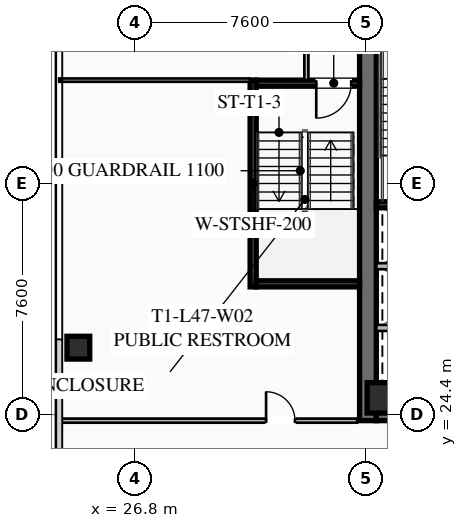
"""IFC4 building model, lengths in metres.
Left out: names, types, materials, properties, quantities, classifications, styles, units other than length and angle.
Written with IfcOpenShell. Run it as: python <this file> out.ifc"""

import sys

from ifc_helpers import new_model, si_unit, direction, frame, frame_2d, origin, origin_2d, place, context, subcontext, project, spatial, rectangle, hollow_rectangle, extrude, element, fill, save


model = new_model("IFC4")
c1 = context("Model", 3, precision=1e-05, world=origin(), true_north=direction((0.0, 1.0)))
c2 = subcontext(c1, "Body", "Model", "MODEL_VIEW")
j1 = project(units=[si_unit("LENGTHUNIT", "METRE"), si_unit("PLANEANGLEUNIT", "RADIAN")], contexts=[c1])
p1 = place(None, origin())
s1 = spatial("IfcSite", under=j1, at=p1, CompositionType="ELEMENT")
p2 = place(p1, origin())
s2 = spatial("IfcBuilding", under=s1, at=p2, CompositionType="ELEMENT")
p3 = place(p2, frame((0.0, 0.0, 174.75)))
s3 = spatial("IfcBuildingStorey", under=s2, at=p3, CompositionType="ELEMENT", Elevation=174.75)
p4 = place(p3, frame((34.475, 24.2, 0.0), z_axis=(0.0, 0.0, 1.0), x_axis=(0.0, 1.0, 0.0)))
e1 = element("IfcWall", 1, at=p4, inside=s3, PredefinedType="SHEAR", context=c2, shape_type="SweptSolid", body=[
    extrude(rectangle(XDim=15.6, YDim=0.55, at=frame_2d((7.8, 0.0))), origin(), (0.0, 0.0, 1.0), 3.55),
])
p5 = place(p3, frame((49.25, 24.475, 0.0), z_axis=(0.0, 0.0, 1.0), x_axis=(-1.0, 0.0, 0.0)))
e2 = element("IfcWall", 2, at=p5, inside=s3, PredefinedType="SHEAR", context=c2, shape_type="SweptSolid", body=[
    extrude(rectangle(XDim=14.5, YDim=0.55, at=frame_2d((7.25, 0.0))), origin(), (0.0, 0.0, 1.0), 3.55),
])
p6 = place(p5, frame((8.95, 0.0, 0.0)))
e3 = element("IfcOpeningElement", 3, at=p6, cuts=e2, PredefinedType="OPENING", context=c2, shape_type="SweptSolid", body=[
    extrude(rectangle(XDim=1.25, YDim=2.25, at=frame_2d((0.625, 1.125))), frame((0.0, 0.285, 0.0), z_axis=(0.0, -1.0, 0.0), x_axis=(1.0, 0.0, 0.0)), (0.0, 0.0, 1.0), 0.57),
])
p7 = place(p5, frame((3.9, 0.0, 0.0)))
e4 = element("IfcOpeningElement", 4, at=p7, cuts=e2, PredefinedType="OPENING", context=c2, shape_type="SweptSolid", body=[
    extrude(rectangle(XDim=1.25, YDim=2.25, at=frame_2d((0.625, 1.125))), frame((0.0, 0.285, 0.0), z_axis=(0.0, -1.0, 0.0), x_axis=(1.0, 0.0, 0.0)), (0.0, 0.0, 1.0), 0.57),
])
p8 = place(p3, frame((34.95, 24.95, 0.0), z_axis=(0.0, 0.0, 1.0), x_axis=(1.0, 0.0, 0.0)))
e5 = element("IfcColumn", 5, at=p8, inside=s3, PredefinedType="COLUMN", context=c2, shape_type="SweptSolid", body=[
    extrude(hollow_rectangle(XDim=1.0, YDim=1.0, WallThickness=0.04, at=origin_2d()), origin(), (0.0, 0.0, 1.0), 3.37),
])
p9 = place(p3, frame((24.95, 26.6, 0.0), z_axis=(0.0, 0.0, 1.0), x_axis=(1.0, 0.0, 0.0)))
e6 = element("IfcColumn", 6, at=p9, inside=s3, PredefinedType="COLUMN", context=c2, shape_type="SweptSolid", body=[
    extrude(hollow_rectangle(XDim=0.75, YDim=0.75, WallThickness=0.032, at=origin_2d()), origin(), (0.0, 0.0, 1.0), 3.37),
])
p10 = place(p3, frame((34.75, 31.3, 0.0), z_axis=(0.0, 0.0, 1.0), x_axis=(1.0, 0.0, 0.0)))
e7 = element("IfcWall", 7, at=p10, inside=s3, PredefinedType="SHEAR", context=c2, shape_type="SweptSolid", body=[
    extrude(rectangle(XDim=3.55, YDim=0.2, at=frame_2d((1.775, 0.0))), origin(), (0.0, 0.0, 1.0), 3.37),
])
for number, where, z_axis, x_axis in (
    (8, (34.75, 27.25, 0.0), (0.0, 0.0, 1.0), (1.0, 0.0, 0.0)),
    (9, (34.75, 29.28, 0.0), (0.0, 0.0, 1.0), (1.0, 0.0, 0.0)),
):
    element("IfcWall", number, at=place(p3, frame(where, z_axis=z_axis, x_axis=x_axis)), inside=s3, PredefinedType="SOLIDWALL", context=c2, shape_type="SweptSolid", body=[
        extrude(rectangle(XDim=3.2, YDim=0.2, at=frame_2d((1.6, 0.0))), origin(), (0.0, 0.0, 1.0), 3.37),
    ])
p11 = place(p3, frame((30.7, 28.6, 0.0), z_axis=(0.0, 0.0, 1.0), x_axis=(0.0, 1.0, 0.0)))
e10 = element("IfcWall", 10, at=p11, inside=s3, PredefinedType="SHEAR", context=c2, shape_type="SweptSolid", body=[
    extrude(rectangle(XDim=6.8, YDim=0.2, at=frame_2d((3.4, 0.0))), origin(), (0.0, 0.0, 1.0), 3.37),
])
p12 = place(p3, frame((34.2, 35.3, 0.0), z_axis=(0.0, 0.0, 1.0), x_axis=(-1.0, 0.0, 0.0)))
e11 = element("IfcWall", 11, at=p12, inside=s3, PredefinedType="SHEAR", context=c2, shape_type="SweptSolid", body=[
    extrude(rectangle(XDim=3.4, YDim=0.2, at=frame_2d((1.7, 0.0))), origin(), (0.0, 0.0, 1.0), 3.37),
])
p13 = place(p12, frame((0.275, 0.0, 0.0)))
e12 = element("IfcOpeningElement", 12, at=p13, cuts=e11, PredefinedType="OPENING", context=c2, shape_type="SweptSolid", body=[
    extrude(rectangle(XDim=1.15, YDim=2.2, at=frame_2d((0.575, 1.1))), frame((0.0, 0.11, 0.0), z_axis=(0.0, -1.0, 0.0), x_axis=(1.0, 0.0, 0.0)), (0.0, 0.0, 1.0), 0.22),
])
p14 = place(p3, frame((30.8, 28.7, 0.0), z_axis=(0.0, 0.0, 1.0), x_axis=(1.0, 0.0, 0.0)))
e13 = element("IfcWall", 13, at=p14, inside=s3, PredefinedType="SHEAR", context=c2, shape_type="SweptSolid", body=[
    extrude(rectangle(XDim=3.4, YDim=0.2, at=frame_2d((1.7, 0.0))), origin(), (0.0, 0.0, 1.0), 3.37),
])
p15 = place(p3, frame((32.45, 35.4, 0.0), z_axis=(0.0, 0.0, 1.0), x_axis=(0.0, 1.0, 0.0)))
e14 = element("IfcWall", 14, at=p15, inside=s3, PredefinedType="PARTITIONING", context=c2, shape_type="SweptSolid", body=[
    extrude(rectangle(XDim=4.4, YDim=0.135, at=frame_2d((2.2, 0.0))), origin(), (0.0, 0.0, 1.0), 2.723),
])
p16 = place(p3, frame((24.32, 24.2, 0.0), z_axis=(0.0, 0.0, 1.0), x_axis=(1.0, 0.0, 0.0)))
e15 = element("IfcWall", 15, at=p16, inside=s3, PredefinedType="PARTITIONING", context=c2, shape_type="SweptSolid", body=[
    extrude(rectangle(XDim=9.8, YDim=0.135, at=frame_2d((4.9, 0.0))), origin(), (0.0, 0.0, 1.0), 2.723),
])
p17 = place(p16, frame((6.805, 0.0, 0.0)))
e16 = element("IfcOpeningElement", 16, at=p17, cuts=e15, PredefinedType="OPENING", context=c2, shape_type="SweptSolid", body=[
    extrude(rectangle(XDim=0.95, YDim=2.05, at=frame_2d((0.475, 1.025))), frame((0.0, 0.077, 0.0), z_axis=(0.0, -1.0, 0.0), x_axis=(1.0, 0.0, 0.0)), (0.0, 0.0, 1.0), 0.155),
])
p18 = place(p3, frame((30.6, 35.4, 0.0), z_axis=(0.0, 0.0, 1.0), x_axis=(-1.0, 0.0, 0.0)))
e17 = element("IfcWall", 17, at=p18, inside=s3, PredefinedType="PARTITIONING", context=c2, shape_type="SweptSolid", body=[
    extrude(rectangle(XDim=6.28, YDim=0.11, at=frame_2d((3.14, 0.0))), origin(), (0.0, 0.0, 1.0), 2.723),
])
p19 = place(p13, origin())
e18 = element("IfcDoor", 18, at=p19, inside=s3, OperationType="SINGLE_SWING_RIGHT", PredefinedType="DOOR", context=c2, shape_type="SweptSolid", body=[
    extrude(rectangle(XDim=1.15, YDim=2.2, at=frame_2d((0.575, 1.1))), frame((0.0, 0.025, 0.0), z_axis=(0.0, -1.0, 0.0), x_axis=(1.0, 0.0, 0.0)), (0.0, 0.0, 1.0), 0.05),
])
fill(e12, e18)
p20 = place(p17, origin())
e19 = element("IfcDoor", 19, at=p20, inside=s3, OperationType="SINGLE_SWING_LEFT", PredefinedType="DOOR", context=c2, shape_type="SweptSolid", body=[
    extrude(rectangle(XDim=0.95, YDim=2.05, at=frame_2d((0.475, 1.025))), frame((0.0, 0.025, 0.0), z_axis=(0.0, -1.0, 0.0), x_axis=(1.0, 0.0, 0.0)), (0.0, 0.0, 1.0), 0.05),
])
fill(e16, e19)
save(model, sys.argv[1])
